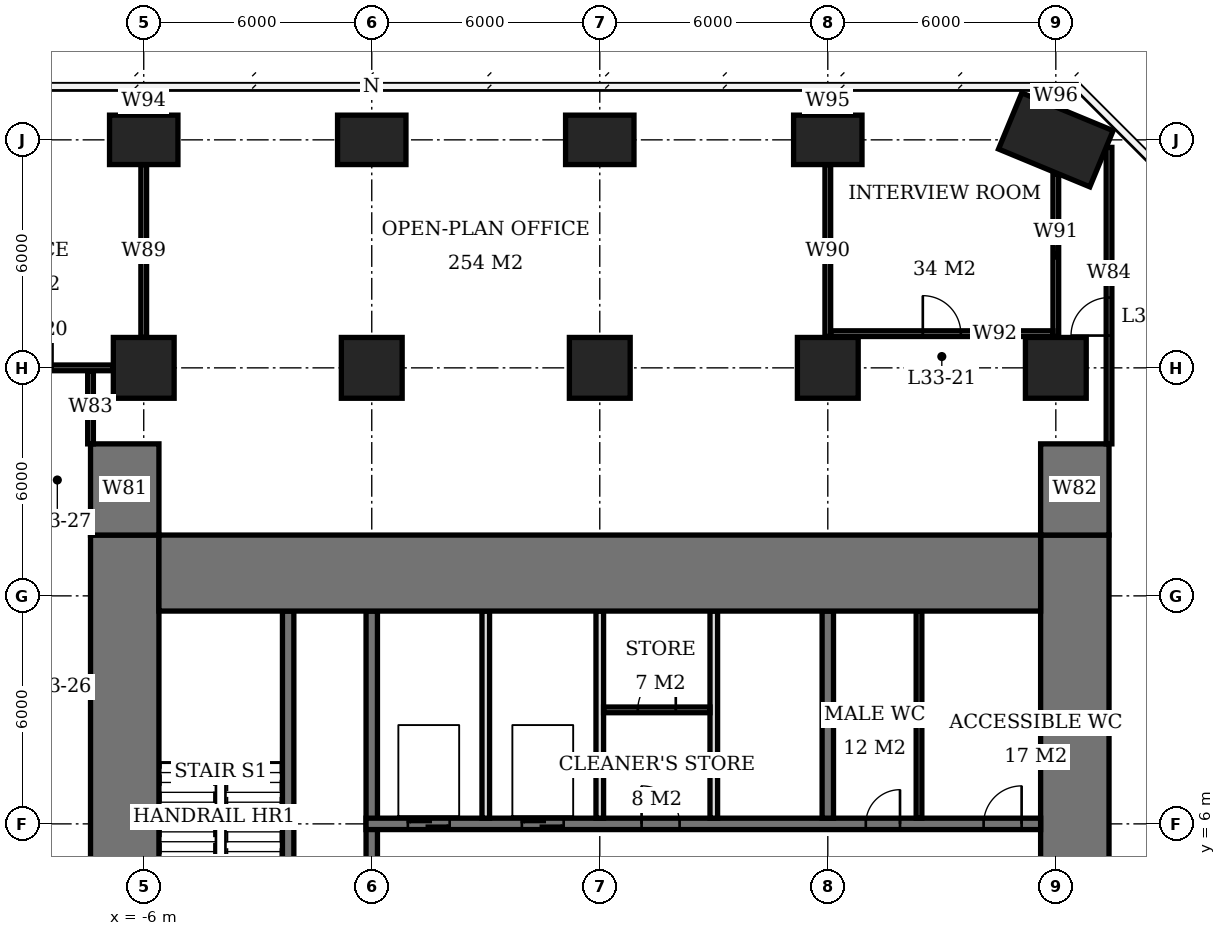
"""IFC4 building model, lengths in metres.
Left out: names, types, materials, properties, quantities, classifications, styles, units other than length and angle.
Written with IfcOpenShell. Run it as: python <this file> out.ifc"""

import sys

from ifc_helpers import new_model, si_unit, direction, frame, frame_2d, origin, origin_2d, place, context, subcontext, project, spatial, rectangle, extrude, element, fill, save


model = new_model("IFC4")
c1 = context("Model", 3, precision=1e-05, world=origin(), true_north=direction((0.0, 1.0)))
c2 = subcontext(c1, "Body", "Model", "MODEL_VIEW")
j1 = project(units=[si_unit("LENGTHUNIT", "METRE"), si_unit("PLANEANGLEUNIT", "RADIAN")], contexts=[c1])
p1 = place(None, origin())
s1 = spatial("IfcSite", under=j1, at=p1, CompositionType="ELEMENT")
p2 = place(p1, origin())
s2 = spatial("IfcBuilding", under=s1, at=p2, CompositionType="ELEMENT")
p3 = place(p2, frame((0.0, 0.0, 136.7)))
s3 = spatial("IfcBuildingStorey", under=s2, at=p3, CompositionType="ELEMENT", Elevation=136.7)
p4 = place(p3, frame((-6.0, 18.0, 0.0), z_axis=(0.0, 0.0, 1.0), x_axis=(1.0, 0.0, 0.0)))
e1 = element("IfcColumn", 1, at=p4, inside=s3, PredefinedType="COLUMN", context=c2, shape_type="SweptSolid", body=[
    extrude(rectangle(XDim=1.6, YDim=1.6, at=origin_2d()), origin(), (0.0, 0.0, 1.0), 3.9),
])
p5 = place(p3, frame((-6.0, 24.0, 0.0), z_axis=(0.0, 0.0, 1.0), x_axis=(1.0, 0.0, 0.0)))
e2 = element("IfcColumn", 2, at=p5, inside=s3, PredefinedType="COLUMN", context=c2, shape_type="SweptSolid", body=[
    extrude(rectangle(XDim=1.8, YDim=1.3, at=origin_2d()), origin(), (0.0, 0.0, 1.0), 3.9),
])
p6 = place(p3, frame((0.0, 18.0, 0.0), z_axis=(0.0, 0.0, 1.0), x_axis=(1.0, 0.0, 0.0)))
e3 = element("IfcColumn", 3, at=p6, inside=s3, PredefinedType="COLUMN", context=c2, shape_type="SweptSolid", body=[
    extrude(rectangle(XDim=1.6, YDim=1.6, at=origin_2d()), origin(), (0.0, 0.0, 1.0), 3.9),
])
p7 = place(p3, frame((0.0, 24.0, 0.0), z_axis=(0.0, 0.0, 1.0), x_axis=(1.0, 0.0, 0.0)))
e4 = element("IfcColumn", 4, at=p7, inside=s3, PredefinedType="COLUMN", context=c2, shape_type="SweptSolid", body=[
    extrude(rectangle(XDim=1.8, YDim=1.3, at=origin_2d()), origin(), (0.0, 0.0, 1.0), 3.9),
])
p8 = place(p3, frame((6.0, 18.0, 0.0), z_axis=(0.0, 0.0, 1.0), x_axis=(1.0, 0.0, 0.0)))
e5 = element("IfcColumn", 5, at=p8, inside=s3, PredefinedType="COLUMN", context=c2, shape_type="SweptSolid", body=[
    extrude(rectangle(XDim=1.6, YDim=1.6, at=origin_2d()), origin(), (0.0, 0.0, 1.0), 3.9),
])
p9 = place(p3, frame((6.0, 24.0, 0.0), z_axis=(0.0, 0.0, 1.0), x_axis=(1.0, 0.0, 0.0)))
e6 = element("IfcColumn", 6, at=p9, inside=s3, PredefinedType="COLUMN", context=c2, shape_type="SweptSolid", body=[
    extrude(rectangle(XDim=1.8, YDim=1.3, at=origin_2d()), origin(), (0.0, 0.0, 1.0), 3.9),
])
p10 = place(p3, frame((12.0, 18.0, 0.0), z_axis=(0.0, 0.0, 1.0), x_axis=(1.0, 0.0, 0.0)))
e7 = element("IfcColumn", 7, at=p10, inside=s3, PredefinedType="COLUMN", context=c2, shape_type="SweptSolid", body=[
    extrude(rectangle(XDim=1.6, YDim=1.6, at=origin_2d()), origin(), (0.0, 0.0, 1.0), 3.9),
])
p11 = place(p3, frame((12.0, 24.0, 0.0), z_axis=(0.0, 0.0, 1.0), x_axis=(1.0, 0.0, 0.0)))
e8 = element("IfcColumn", 8, at=p11, inside=s3, PredefinedType="COLUMN", context=c2, shape_type="SweptSolid", body=[
    extrude(rectangle(XDim=1.8, YDim=1.3, at=origin_2d()), origin(), (0.0, 0.0, 1.0), 3.9),
])
p12 = place(p3, frame((18.0, 18.0, 0.0), z_axis=(0.0, 0.0, 1.0), x_axis=(1.0, 0.0, 0.0)))
e9 = element("IfcColumn", 9, at=p12, inside=s3, PredefinedType="COLUMN", context=c2, shape_type="SweptSolid", body=[
    extrude(rectangle(XDim=1.6, YDim=1.6, at=origin_2d()), origin(), (0.0, 0.0, 1.0), 3.9),
])
p13 = place(p3, frame((18.0, 24.0, 0.0), z_axis=(0.0, 0.0, 1.0), x_axis=(0.923879532511, -0.382683432365, 0.0)))
e10 = element("IfcColumn", 10, at=p13, inside=s3, PredefinedType="COLUMN", context=c2, shape_type="SweptSolid", body=[
    extrude(rectangle(XDim=2.6, YDim=1.6, at=origin_2d()), origin(), (0.0, 0.0, 1.0), 3.9),
])
p14 = place(p3, frame((-5.6, 12.6, 0.0), z_axis=(0.0, 0.0, 1.0), x_axis=(1.0, 0.0, 0.0)))
e11 = element("IfcWall", 11, at=p14, inside=s3, PredefinedType="SHEAR", context=c2, shape_type="SweptSolid", body=[
    extrude(rectangle(XDim=23.2, YDim=2.0, at=frame_2d((11.6, 0.0))), origin(), (0.0, 0.0, 1.0), 3.9),
])
p15 = place(p3, frame((-6.5, -7.6, 0.0), z_axis=(0.0, 0.0, 1.0), x_axis=(0.0, 1.0, 0.0)))
e12 = element("IfcWall", 12, at=p15, inside=s3, PredefinedType="SHEAR", context=c2, shape_type="SweptSolid", body=[
    extrude(rectangle(XDim=21.2, YDim=1.8, at=frame_2d((10.6, 0.0))), origin(), (0.0, 0.0, 1.0), 3.9),
])
p16 = place(p15, frame((7.8, 0.0, 0.0)))
e13 = element("IfcOpeningElement", 13, at=p16, cuts=e12, PredefinedType="OPENING", context=c2, shape_type="SweptSolid", body=[
    extrude(rectangle(XDim=1.8, YDim=2.4, at=frame_2d((0.9, 1.2))), frame((0.0, 0.91, 0.0), z_axis=(0.0, -1.0, 0.0), x_axis=(1.0, 0.0, 0.0)), (0.0, 0.0, 1.0), 1.82),
])
p17 = place(p3, frame((18.5, -7.6, 0.0), z_axis=(0.0, 0.0, 1.0), x_axis=(0.0, 1.0, 0.0)))
e14 = element("IfcWall", 14, at=p17, inside=s3, PredefinedType="SHEAR", context=c2, shape_type="SweptSolid", body=[
    extrude(rectangle(XDim=21.2, YDim=1.8, at=frame_2d((10.6, 0.0))), origin(), (0.0, 0.0, 1.0), 3.9),
])
p18 = place(p17, frame((9.2, 0.0, 0.0)))
e15 = element("IfcOpeningElement", 15, at=p18, cuts=e14, PredefinedType="OPENING", context=c2, shape_type="SweptSolid", body=[
    extrude(rectangle(XDim=1.8, YDim=2.4, at=frame_2d((0.9, 1.2))), frame((0.0, 0.91, 0.0), z_axis=(0.0, -1.0, 0.0), x_axis=(1.0, 0.0, 0.0)), (0.0, 0.0, 1.0), 1.82),
])
for number, where, z_axis, x_axis in (
    (16, (-6.5, 13.6, 0.0), (0.0, 0.0, 1.0), (0.0, 1.0, 0.0)),
    (17, (18.5, 13.6, 0.0), (0.0, 0.0, 1.0), (0.0, 1.0, 0.0)),
):
    element("IfcWall", number, at=place(p3, frame(where, z_axis=z_axis, x_axis=x_axis)), inside=s3, PredefinedType="SHEAR", context=c2, shape_type="SweptSolid", body=[
        extrude(rectangle(XDim=2.4, YDim=1.8, at=frame_2d((1.2, 0.0))), origin(), (0.0, 0.0, 1.0), 3.9),
    ])
p19 = place(p3, frame((-0.15, 6.0, 0.0), z_axis=(0.0, 0.0, 1.0), x_axis=(1.0, 0.0, 0.0)))
e18 = element("IfcWall", 18, at=p19, inside=s3, PredefinedType="SHEAR", context=c2, shape_type="SweptSolid", body=[
    extrude(rectangle(XDim=17.75, YDim=0.3, at=frame_2d((8.875, 0.0))), origin(), (0.0, 0.0, 1.0), 3.9),
])
p20 = place(p19, frame((13.15, 0.0, 0.0)))
e19 = element("IfcOpeningElement", 19, at=p20, cuts=e18, PredefinedType="OPENING", context=c2, shape_type="SweptSolid", body=[
    extrude(rectangle(XDim=0.9, YDim=2.1, at=frame_2d((0.45, 1.05))), frame((0.0, 0.16, 0.0), z_axis=(0.0, -1.0, 0.0), x_axis=(1.0, 0.0, 0.0)), (0.0, 0.0, 1.0), 0.32),
])
p21 = place(p19, frame((16.25, 0.0, 0.0)))
e20 = element("IfcOpeningElement", 20, at=p21, cuts=e18, PredefinedType="OPENING", context=c2, shape_type="SweptSolid", body=[
    extrude(rectangle(XDim=1.0, YDim=2.1, at=frame_2d((0.5, 1.05))), frame((0.0, 0.16, 0.0), z_axis=(0.0, -1.0, 0.0), x_axis=(1.0, 0.0, 0.0)), (0.0, 0.0, 1.0), 0.32),
])
p22 = place(p19, frame((7.25, 0.0, 0.0)))
e21 = element("IfcOpeningElement", 21, at=p22, cuts=e18, PredefinedType="OPENING", context=c2, shape_type="SweptSolid", body=[
    extrude(rectangle(XDim=1.0, YDim=2.1, at=frame_2d((0.5, 1.05))), frame((0.0, 0.16, 0.0), z_axis=(0.0, -1.0, 0.0), x_axis=(1.0, 0.0, 0.0)), (0.0, 0.0, 1.0), 0.32),
])
p23 = place(p19, frame((1.1, 0.0, 0.0)))
e22 = element("IfcOpeningElement", 22, at=p23, cuts=e18, PredefinedType="OPENING", context=c2, shape_type="SweptSolid", body=[
    extrude(rectangle(XDim=1.1, YDim=2.1, at=frame_2d((0.55, 1.05))), frame((0.0, 0.16, 0.0), z_axis=(0.0, -1.0, 0.0), x_axis=(1.0, 0.0, 0.0)), (0.0, 0.0, 1.0), 0.32),
])
p24 = place(p19, frame((4.1, 0.0, 0.0)))
e23 = element("IfcOpeningElement", 23, at=p24, cuts=e18, PredefinedType="OPENING", context=c2, shape_type="SweptSolid", body=[
    extrude(rectangle(XDim=1.1, YDim=2.1, at=frame_2d((0.55, 1.05))), frame((0.0, 0.16, 0.0), z_axis=(0.0, -1.0, 0.0), x_axis=(1.0, 0.0, 0.0)), (0.0, 0.0, 1.0), 0.32),
])
p25 = place(p3, frame((0.0, 3.15, 0.0), z_axis=(0.0, 0.0, 1.0), x_axis=(0.0, 1.0, 0.0)))
e24 = element("IfcWall", 24, at=p25, inside=s3, PredefinedType="SHEAR", context=c2, shape_type="SweptSolid", body=[
    extrude(rectangle(XDim=8.45, YDim=0.3, at=frame_2d((4.225, 0.0))), origin(), (0.0, 0.0, 1.0), 3.9),
])
p26 = place(p3, frame((12.0, 6.15, 0.0), z_axis=(0.0, 0.0, 1.0), x_axis=(0.0, 1.0, 0.0)))
e25 = element("IfcWall", 25, at=p26, inside=s3, PredefinedType="SHEAR", context=c2, shape_type="SweptSolid", body=[
    extrude(rectangle(XDim=5.45, YDim=0.3, at=frame_2d((2.725, 0.0))), origin(), (0.0, 0.0, 1.0), 3.9),
])
p27 = place(p3, frame((-2.2, 3.15, 0.0), z_axis=(0.0, 0.0, 1.0), x_axis=(0.0, 1.0, 0.0)))
e26 = element("IfcWall", 26, at=p27, inside=s3, PredefinedType="SHEAR", context=c2, shape_type="SweptSolid", body=[
    extrude(rectangle(XDim=8.45, YDim=0.3, at=frame_2d((4.225, 0.0))), origin(), (0.0, 0.0, 1.0), 3.9),
])
for number, where, z_axis, x_axis in (
    (27, (3.0, 6.15, 0.0), (0.0, 0.0, 1.0), (0.0, 1.0, 0.0)),
    (28, (6.0, 6.15, 0.0), (0.0, 0.0, 1.0), (0.0, 1.0, 0.0)),
    (29, (9.0, 6.15, 0.0), (0.0, 0.0, 1.0), (0.0, 1.0, 0.0)),
):
    element("IfcWall", number, at=place(p3, frame(where, z_axis=z_axis, x_axis=x_axis)), inside=s3, PredefinedType="SOLIDWALL", context=c2, shape_type="SweptSolid", body=[
        extrude(rectangle(XDim=5.45, YDim=0.2, at=frame_2d((2.725, 0.0))), origin(), (0.0, 0.0, 1.0), 3.9),
    ])
p28 = place(p3, frame((14.4, 6.15, 0.0), z_axis=(0.0, 0.0, 1.0), x_axis=(0.0, 1.0, 0.0)))
e30 = element("IfcWall", 30, at=p28, inside=s3, PredefinedType="PLUMBINGWALL", context=c2, shape_type="SweptSolid", body=[
    extrude(rectangle(XDim=5.45, YDim=0.15, at=frame_2d((2.725, 0.0))), origin(), (0.0, 0.0, 1.0), 3.65),
])
p29 = place(p3, frame((6.1, 9.0, 0.0), z_axis=(0.0, 0.0, 1.0), x_axis=(1.0, 0.0, 0.0)))
e31 = element("IfcWall", 31, at=p29, inside=s3, PredefinedType="PARTITIONING", context=c2, shape_type="SweptSolid", body=[
    extrude(rectangle(XDim=2.8, YDim=0.15, at=frame_2d((1.4, 0.0))), origin(), (0.0, 0.0, 1.0), 3.65),
])
p30 = place(p29, frame((0.9, 0.0, 0.0)))
e32 = element("IfcOpeningElement", 32, at=p30, cuts=e31, PredefinedType="OPENING", context=c2, shape_type="SweptSolid", body=[
    extrude(rectangle(XDim=1.0, YDim=2.1, at=frame_2d((0.5, 1.05))), frame((0.0, 0.085, 0.0), z_axis=(0.0, -1.0, 0.0), x_axis=(1.0, 0.0, 0.0)), (0.0, 0.0, 1.0), 0.17),
])
p31 = place(p3, frame((-11.2, 18.0, 0.0), z_axis=(0.0, 0.0, 1.0), x_axis=(1.0, 0.0, 0.0)))
e33 = element("IfcWall", 33, at=p31, inside=s3, PredefinedType="PARTITIONING", context=c2, shape_type="SweptSolid", body=[
    extrude(rectangle(XDim=4.4, YDim=0.15, at=frame_2d((2.2, 0.0))), origin(), (0.0, 0.0, 1.0), 3.65),
])
p32 = place(p31, frame((1.8, 0.0, 0.0)))
e34 = element("IfcOpeningElement", 34, at=p32, cuts=e33, PredefinedType="OPENING", context=c2, shape_type="SweptSolid", body=[
    extrude(rectangle(XDim=1.0, YDim=2.1, at=frame_2d((0.5, 1.05))), frame((0.0, 0.085, 0.0), z_axis=(0.0, -1.0, 0.0), x_axis=(1.0, 0.0, 0.0)), (0.0, 0.0, 1.0), 0.17),
])
p33 = place(p3, frame((12.075, 18.9, 0.0), z_axis=(0.0, 0.0, 1.0), x_axis=(1.0, 0.0, 0.0)))
e35 = element("IfcWall", 35, at=p33, inside=s3, PredefinedType="PARTITIONING", context=c2, shape_type="SweptSolid", body=[
    extrude(rectangle(XDim=5.85, YDim=0.15, at=frame_2d((2.925, 0.0))), origin(), (0.0, 0.0, 1.0), 3.65),
])
p34 = place(p33, frame((2.425, 0.0, 0.0)))
e36 = element("IfcOpeningElement", 36, at=p34, cuts=e35, PredefinedType="OPENING", context=c2, shape_type="SweptSolid", body=[
    extrude(rectangle(XDim=1.0, YDim=2.1, at=frame_2d((0.5, 1.05))), frame((0.0, 0.085, 0.0), z_axis=(0.0, -1.0, 0.0), x_axis=(1.0, 0.0, 0.0)), (0.0, 0.0, 1.0), 0.17),
])
p35 = place(p3, frame((-6.0, 18.8, 0.0), z_axis=(0.0, 0.0, 1.0), x_axis=(0.0, 1.0, 0.0)))
e37 = element("IfcWall", 37, at=p35, inside=s3, PredefinedType="PARTITIONING", context=c2, shape_type="SweptSolid", body=[
    extrude(rectangle(XDim=4.55, YDim=0.15, at=frame_2d((2.275, 0.0))), origin(), (0.0, 0.0, 1.0), 3.65),
])
p36 = place(p3, frame((-6.0, 24.65, 0.0), z_axis=(0.0, 0.0, 1.0), x_axis=(0.0, 1.0, 0.0)))
e38 = element("IfcWall", 38, at=p36, inside=s3, PredefinedType="PARTITIONING", context=c2, shape_type="SweptSolid", body=[
    extrude(rectangle(XDim=0.75, YDim=0.15, at=frame_2d((0.375, 0.0))), origin(), (0.0, 0.0, 1.0), 3.65),
])
p37 = place(p3, frame((12.0, 18.825, 0.0), z_axis=(0.0, 0.0, 1.0), x_axis=(0.0, 1.0, 0.0)))
e39 = element("IfcWall", 39, at=p37, inside=s3, PredefinedType="PARTITIONING", context=c2, shape_type="SweptSolid", body=[
    extrude(rectangle(XDim=4.525, YDim=0.15, at=frame_2d((2.263, 0.0))), origin(), (0.0, 0.0, 1.0), 3.65),
])
p38 = place(p3, frame((12.0, 24.65, 0.0), z_axis=(0.0, 0.0, 1.0), x_axis=(0.0, 1.0, 0.0)))
e40 = element("IfcWall", 40, at=p38, inside=s3, PredefinedType="PARTITIONING", context=c2, shape_type="SweptSolid", body=[
    extrude(rectangle(XDim=0.75, YDim=0.15, at=frame_2d((0.375, 0.0))), origin(), (0.0, 0.0, 1.0), 3.65),
])
p39 = place(p3, frame((18.0, 18.825, 0.0), z_axis=(0.0, 0.0, 1.0), x_axis=(0.0, 1.0, 0.0)))
e41 = element("IfcWall", 41, at=p39, inside=s3, PredefinedType="PARTITIONING", context=c2, shape_type="SweptSolid", body=[
    extrude(rectangle(XDim=4.278, YDim=0.15, at=frame_2d((2.139, 0.0))), origin(), (0.0, 0.0, 1.0), 3.65),
])
p40 = place(p3, frame((18.0, 24.897, 0.0), z_axis=(0.0, 0.0, 1.0), x_axis=(0.0, 1.0, 0.0)))
e42 = element("IfcWall", 42, at=p40, inside=s3, PredefinedType="PARTITIONING", context=c2, shape_type="SweptSolid", body=[
    extrude(rectangle(XDim=0.503, YDim=0.15, at=frame_2d((0.251, 0.0))), origin(), (0.0, 0.0, 1.0), 3.65),
])
p41 = place(p3, frame((-7.4, 16.0, 0.0), z_axis=(0.0, 0.0, 1.0), x_axis=(0.0, 1.0, 0.0)))
e43 = element("IfcWall", 43, at=p41, inside=s3, PredefinedType="PARTITIONING", context=c2, shape_type="SweptSolid", body=[
    extrude(rectangle(XDim=1.925, YDim=0.15, at=frame_2d((0.962, 0.0))), origin(), (0.0, 0.0, 1.0), 3.65),
])
p42 = place(p3, frame((19.4, 16.0, 0.0), z_axis=(0.0, 0.0, 1.0), x_axis=(0.0, 1.0, 0.0)))
e44 = element("IfcWall", 44, at=p42, inside=s3, PredefinedType="PARTITIONING", context=c2, shape_type="SweptSolid", body=[
    extrude(rectangle(XDim=7.802, YDim=0.15, at=frame_2d((3.901, 0.0))), origin(), (0.0, 0.0, 1.0), 3.65),
])
p43 = place(p42, frame((2.85, 0.0, 0.0)))
e45 = element("IfcOpeningElement", 45, at=p43, cuts=e44, PredefinedType="OPENING", context=c2, shape_type="SweptSolid", body=[
    extrude(rectangle(XDim=1.0, YDim=2.1, at=frame_2d((0.5, 1.05))), frame((0.0, 0.085, 0.0), z_axis=(0.0, -1.0, 0.0), x_axis=(1.0, 0.0, 0.0)), (0.0, 0.0, 1.0), 0.17),
])
p44 = place(p20, origin())
e46 = element("IfcDoor", 46, at=p44, inside=s3, OperationType="SINGLE_SWING_RIGHT", PredefinedType="DOOR", context=c2, shape_type="SweptSolid", body=[
    extrude(rectangle(XDim=0.9, YDim=2.1, at=frame_2d((0.45, 1.05))), frame((0.0, 0.025, 0.0), z_axis=(0.0, -1.0, 0.0), x_axis=(1.0, 0.0, 0.0)), (0.0, 0.0, 1.0), 0.05),
])
fill(e19, e46)
p45 = place(p21, origin())
e47 = element("IfcDoor", 47, at=p45, inside=s3, OperationType="SINGLE_SWING_RIGHT", PredefinedType="DOOR", context=c2, shape_type="SweptSolid", body=[
    extrude(rectangle(XDim=1.0, YDim=2.1, at=frame_2d((0.5, 1.05))), frame((0.0, 0.025, 0.0), z_axis=(0.0, -1.0, 0.0), x_axis=(1.0, 0.0, 0.0)), (0.0, 0.0, 1.0), 0.05),
])
fill(e20, e47)
p46 = place(p30, origin())
e48 = element("IfcDoor", 48, at=p46, inside=s3, OperationType="SINGLE_SWING_RIGHT", PredefinedType="DOOR", context=c2, shape_type="SweptSolid", body=[
    extrude(rectangle(XDim=1.0, YDim=2.1, at=frame_2d((0.5, 1.05))), frame((0.0, 0.025, 0.0), z_axis=(0.0, -1.0, 0.0), x_axis=(1.0, 0.0, 0.0)), (0.0, 0.0, 1.0), 0.05),
])
fill(e32, e48)
p47 = place(p22, origin())
e49 = element("IfcDoor", 49, at=p47, inside=s3, OperationType="SINGLE_SWING_LEFT", PredefinedType="DOOR", context=c2, shape_type="SweptSolid", body=[
    extrude(rectangle(XDim=1.0, YDim=2.1, at=frame_2d((0.5, 1.05))), frame((0.0, 0.025, 0.0), z_axis=(0.0, -1.0, 0.0), x_axis=(1.0, 0.0, 0.0)), (0.0, 0.0, 1.0), 0.05),
])
fill(e21, e49)
p48 = place(p23, origin())
e50 = element("IfcDoor", 50, at=p48, inside=s3, OperationType="DOUBLE_DOOR_SLIDING", PredefinedType="USERDEFINED", context=c2, shape_type="SweptSolid", body=[
    extrude(rectangle(XDim=1.1, YDim=2.1, at=frame_2d((0.55, 1.05))), frame((0.0, 0.025, 0.0), z_axis=(0.0, -1.0, 0.0), x_axis=(1.0, 0.0, 0.0)), (0.0, 0.0, 1.0), 0.05),
])
fill(e22, e50)
p49 = place(p24, origin())
e51 = element("IfcDoor", 51, at=p49, inside=s3, OperationType="DOUBLE_DOOR_SLIDING", PredefinedType="USERDEFINED", context=c2, shape_type="SweptSolid", body=[
    extrude(rectangle(XDim=1.1, YDim=2.1, at=frame_2d((0.55, 1.05))), frame((0.0, 0.025, 0.0), z_axis=(0.0, -1.0, 0.0), x_axis=(1.0, 0.0, 0.0)), (0.0, 0.0, 1.0), 0.05),
])
fill(e23, e51)
p50 = place(p34, origin())
e52 = element("IfcDoor", 52, at=p50, inside=s3, OperationType="SINGLE_SWING_LEFT", PredefinedType="DOOR", context=c2, shape_type="SweptSolid", body=[
    extrude(rectangle(XDim=1.0, YDim=2.1, at=frame_2d((0.5, 1.05))), frame((0.0, 0.025, 0.0), z_axis=(0.0, -1.0, 0.0), x_axis=(1.0, 0.0, 0.0)), (0.0, 0.0, 1.0), 0.05),
])
fill(e36, e52)
p51 = place(p43, origin())
e53 = element("IfcDoor", 53, at=p51, inside=s3, OperationType="SINGLE_SWING_LEFT", PredefinedType="DOOR", context=c2, shape_type="SweptSolid", body=[
    extrude(rectangle(XDim=1.0, YDim=2.1, at=frame_2d((0.5, 1.05))), frame((0.0, 0.025, 0.0), z_axis=(0.0, -1.0, 0.0), x_axis=(1.0, 0.0, 0.0)), (0.0, 0.0, 1.0), 0.05),
])
fill(e45, e53)
save(model, sys.argv[1])
